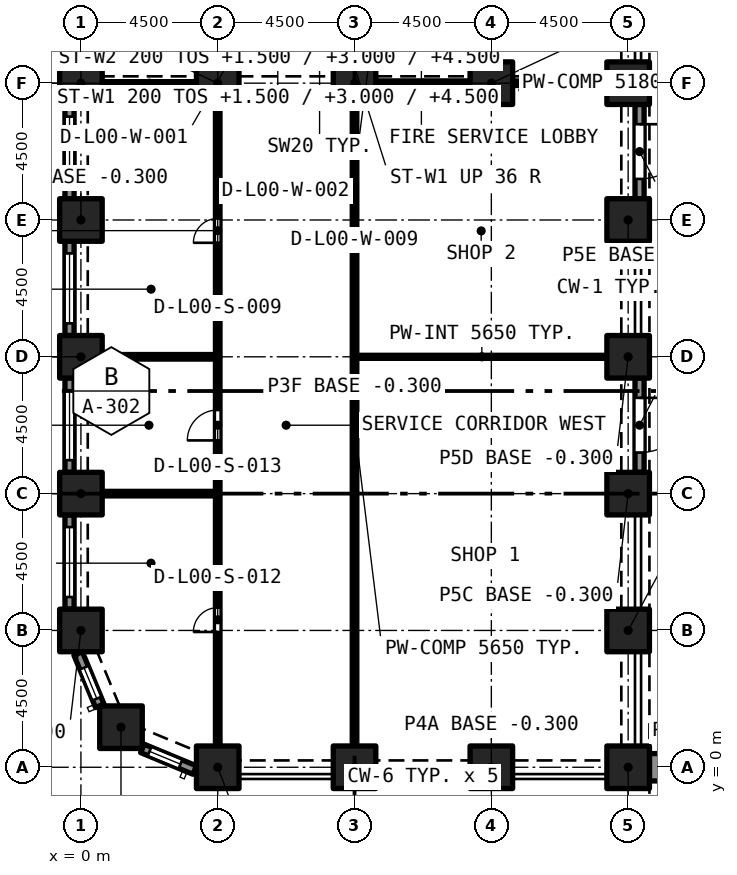
"""IFC4 building model, lengths in metres.
Left out: names, types, materials, properties, quantities, classifications, styles, units other than length and angle.
Written with IfcOpenShell. Run it as: python <this file> out.ifc"""

import sys

from ifc_helpers import new_model, si_unit, direction, frame, frame_2d, origin, origin_2d, place, context, subcontext, project, spatial, rectangle, extrude, element, fill, save


model = new_model("IFC4")
c1 = context("Model", 3, precision=1e-05, world=origin(), true_north=direction((0.0, 1.0)))
c2 = subcontext(c1, "Body", "Model", "MODEL_VIEW")
j1 = project(units=[si_unit("LENGTHUNIT", "METRE"), si_unit("PLANEANGLEUNIT", "RADIAN")], contexts=[c1])
p1 = place(None, origin())
s1 = spatial("IfcSite", under=j1, at=p1, CompositionType="ELEMENT")
p2 = place(p1, origin())
s2 = spatial("IfcBuilding", under=s1, at=p2, CompositionType="ELEMENT")
p3 = place(p2, origin())
s3 = spatial("IfcBuildingStorey", under=s2, at=p3, CompositionType="ELEMENT", Elevation=0.0)
for number, where, z_axis, x_axis in (
    (1, (4.5, 0.0, -0.3), (0.0, 0.0, 1.0), (1.0, 0.0, 0.0)),
    (2, (9.0, 0.0, -0.3), (0.0, 0.0, 1.0), (1.0, 0.0, 0.0)),
    (3, (13.5, 0.0, -0.3), (0.0, 0.0, 1.0), (1.0, 0.0, 0.0)),
    (4, (18.0, 0.0, -0.3), (0.0, 0.0, 1.0), (1.0, 0.0, 0.0)),
    (5, (1.318, 1.318, -0.3), (0.0, 0.0, 1.0), (1.0, 0.0, 0.0)),
    (6, (0.0, 4.5, -0.3), (0.0, 0.0, 1.0), (1.0, 0.0, 0.0)),
    (7, (18.0, 4.5, -0.3), (0.0, 0.0, 1.0), (1.0, 0.0, 0.0)),
    (8, (0.0, 9.0, -0.3), (0.0, 0.0, 1.0), (1.0, 0.0, 0.0)),
    (9, (18.0, 9.0, -0.3), (0.0, 0.0, 1.0), (1.0, 0.0, 0.0)),
    (10, (0.0, 13.5, -0.3), (0.0, 0.0, 1.0), (1.0, 0.0, 0.0)),
    (11, (18.0, 13.5, -0.3), (0.0, 0.0, 1.0), (1.0, 0.0, 0.0)),
    (12, (0.0, 18.0, -0.3), (0.0, 0.0, 1.0), (1.0, 0.0, 0.0)),
    (13, (18.0, 18.0, -0.3), (0.0, 0.0, 1.0), (1.0, 0.0, 0.0)),
    (14, (0.0, 22.5, -0.3), (0.0, 0.0, 1.0), (1.0, 0.0, 0.0)),
    (15, (4.5, 22.5, -0.3), (0.0, 0.0, 1.0), (1.0, 0.0, 0.0)),
    (16, (9.0, 22.5, -0.3), (0.0, 0.0, 1.0), (1.0, 0.0, 0.0)),
    (17, (13.5, 22.5, -0.3), (0.0, 0.0, 1.0), (1.0, 0.0, 0.0)),
    (18, (18.0, 22.5, -0.3), (0.0, 0.0, 1.0), (1.0, 0.0, 0.0)),
):
    element("IfcColumn", number, at=place(p3, frame(where, z_axis=z_axis, x_axis=x_axis)), inside=s3, PredefinedType="COLUMN", context=c2, shape_type="SweptSolid", body=[
        extrude(rectangle(XDim=1.4, YDim=1.4, at=origin_2d()), origin(), (0.0, 0.0, 1.0), 6.3),
    ])
p4 = place(p3, frame((-0.375, 23.2, 0.0), z_axis=(0.0, 0.0, 1.0), x_axis=(0.0, 1.0, 0.0)))
e19 = element("IfcWall", 19, at=p4, inside=s3, PredefinedType="SOLIDWALL", context=c2, shape_type="SweptSolid", body=[
    extrude(rectangle(XDim=3.1, YDim=0.3, at=frame_2d((1.55, 0.0))), origin(), (0.0, 0.0, 1.0), 6.0),
])
p5 = place(p4, frame((0.4, 0.0, 0.45)))
e20 = element("IfcOpeningElement", 20, at=p5, cuts=e19, PredefinedType="OPENING", context=c2, shape_type="SweptSolid", body=[
    extrude(rectangle(XDim=2.3, YDim=3.3, at=frame_2d((1.15, 1.65))), frame((0.0, 0.16, 0.0), z_axis=(0.0, -1.0, 0.0), x_axis=(1.0, 0.0, 0.0)), (0.0, 0.0, 1.0), 0.32),
])
p6 = place(p3, frame((-0.375, 18.7, 0.0), z_axis=(0.0, 0.0, 1.0), x_axis=(0.0, 1.0, 0.0)))
e21 = element("IfcWall", 21, at=p6, inside=s3, PredefinedType="SOLIDWALL", context=c2, shape_type="SweptSolid", body=[
    extrude(rectangle(XDim=3.1, YDim=0.3, at=frame_2d((1.55, 0.0))), origin(), (0.0, 0.0, 1.0), 6.0),
])
p7 = place(p6, frame((0.4, 0.0, 0.45)))
e22 = element("IfcOpeningElement", 22, at=p7, cuts=e21, PredefinedType="OPENING", context=c2, shape_type="SweptSolid", body=[
    extrude(rectangle(XDim=2.3, YDim=3.3, at=frame_2d((1.15, 1.65))), frame((0.0, 0.16, 0.0), z_axis=(0.0, -1.0, 0.0), x_axis=(1.0, 0.0, 0.0)), (0.0, 0.0, 1.0), 0.32),
])
p8 = place(p3, frame((-0.375, 14.2, 0.0), z_axis=(0.0, 0.0, 1.0), x_axis=(0.0, 1.0, 0.0)))
e23 = element("IfcWall", 23, at=p8, inside=s3, PredefinedType="SOLIDWALL", context=c2, shape_type="SweptSolid", body=[
    extrude(rectangle(XDim=3.1, YDim=0.3, at=frame_2d((1.55, 0.0))), origin(), (0.0, 0.0, 1.0), 6.0),
])
p9 = place(p8, frame((0.4, 0.0, 0.45)))
e24 = element("IfcOpeningElement", 24, at=p9, cuts=e23, PredefinedType="OPENING", context=c2, shape_type="SweptSolid", body=[
    extrude(rectangle(XDim=2.3, YDim=3.3, at=frame_2d((1.15, 1.65))), frame((0.0, 0.16, 0.0), z_axis=(0.0, -1.0, 0.0), x_axis=(1.0, 0.0, 0.0)), (0.0, 0.0, 1.0), 0.32),
])
p10 = place(p3, frame((-0.375, 9.7, 0.0), z_axis=(0.0, 0.0, 1.0), x_axis=(0.0, 1.0, 0.0)))
e25 = element("IfcWall", 25, at=p10, inside=s3, PredefinedType="SOLIDWALL", context=c2, shape_type="SweptSolid", body=[
    extrude(rectangle(XDim=3.1, YDim=0.3, at=frame_2d((1.55, 0.0))), origin(), (0.0, 0.0, 1.0), 6.0),
])
p11 = place(p10, frame((0.4, 0.0, 0.45)))
e26 = element("IfcOpeningElement", 26, at=p11, cuts=e25, PredefinedType="OPENING", context=c2, shape_type="SweptSolid", body=[
    extrude(rectangle(XDim=2.3, YDim=3.3, at=frame_2d((1.15, 1.65))), frame((0.0, 0.16, 0.0), z_axis=(0.0, -1.0, 0.0), x_axis=(1.0, 0.0, 0.0)), (0.0, 0.0, 1.0), 0.32),
])
p12 = place(p3, frame((-0.375, 5.2, 0.0), z_axis=(0.0, 0.0, 1.0), x_axis=(0.0, 1.0, 0.0)))
e27 = element("IfcWall", 27, at=p12, inside=s3, PredefinedType="SOLIDWALL", context=c2, shape_type="SweptSolid", body=[
    extrude(rectangle(XDim=3.1, YDim=0.3, at=frame_2d((1.55, 0.0))), origin(), (0.0, 0.0, 1.0), 6.0),
])
p13 = place(p12, frame((0.4, 0.0, 0.45)))
e28 = element("IfcOpeningElement", 28, at=p13, cuts=e27, PredefinedType="OPENING", context=c2, shape_type="SweptSolid", body=[
    extrude(rectangle(XDim=2.3, YDim=3.3, at=frame_2d((1.15, 1.65))), frame((0.0, 0.16, 0.0), z_axis=(0.0, -1.0, 0.0), x_axis=(1.0, 0.0, 0.0)), (0.0, 0.0, 1.0), 0.32),
])
p14 = place(p3, frame((0.622, 2.02, 0.0), z_axis=(0.0, 0.0, 1.0), x_axis=(-0.38262540684, 0.923903565336, 0.0)))
e29 = element("IfcWall", 29, at=p14, inside=s3, PredefinedType="SOLIDWALL", context=c2, shape_type="SweptSolid", body=[
    extrude(rectangle(XDim=1.865, YDim=0.3, at=frame_2d((0.933, 0.0))), origin(), (0.0, 0.0, 1.0), 6.0),
])
p15 = place(p14, frame((0.258, 0.0, 0.45)))
e30 = element("IfcOpeningElement", 30, at=p15, cuts=e29, PredefinedType="OPENING", context=c2, shape_type="SweptSolid", body=[
    extrude(rectangle(XDim=1.1, YDim=3.3, at=frame_2d((0.55, 1.65))), frame((0.0, 0.16, 0.0), z_axis=(0.0, -1.0, 0.0), x_axis=(1.0, 0.0, 0.0)), (0.0, 0.0, 1.0), 0.32),
])
p16 = place(p3, frame((3.743, -0.092, 0.0), z_axis=(0.0, 0.0, 1.0), x_axis=(-0.923857286003, 0.382737135771, 0.0)))
e31 = element("IfcWall", 31, at=p16, inside=s3, PredefinedType="SOLIDWALL", context=c2, shape_type="SweptSolid", body=[
    extrude(rectangle(XDim=1.865, YDim=0.3, at=frame_2d((0.933, 0.0))), origin(), (0.0, 0.0, 1.0), 6.0),
])
p17 = place(p16, frame((0.508, 0.0, 0.45)))
e32 = element("IfcOpeningElement", 32, at=p17, cuts=e31, PredefinedType="OPENING", context=c2, shape_type="SweptSolid", body=[
    extrude(rectangle(XDim=1.1, YDim=3.3, at=frame_2d((0.55, 1.65))), frame((0.0, 0.16, 0.0), z_axis=(0.0, -1.0, 0.0), x_axis=(1.0, 0.0, 0.0)), (0.0, 0.0, 1.0), 0.32),
])
p18 = place(p3, frame((18.375, 12.8, 0.0), z_axis=(0.0, 0.0, 1.0), x_axis=(0.0, -1.0, 0.0)))
e33 = element("IfcWall", 33, at=p18, inside=s3, PredefinedType="SOLIDWALL", context=c2, shape_type="SweptSolid", body=[
    extrude(rectangle(XDim=3.1, YDim=0.3, at=frame_2d((1.55, 0.0))), origin(), (0.0, 0.0, 1.0), 6.0),
])
p19 = place(p18, frame((0.65, 0.0, 0.0)))
e34 = element("IfcOpeningElement", 34, at=p19, cuts=e33, PredefinedType="OPENING", context=c2, shape_type="SweptSolid", body=[
    extrude(rectangle(XDim=1.8, YDim=2.4, at=frame_2d((0.9, 1.2))), frame((0.0, 0.16, 0.0), z_axis=(0.0, -1.0, 0.0), x_axis=(1.0, 0.0, 0.0)), (0.0, 0.0, 1.0), 0.32),
])
p20 = place(p3, frame((18.375, 21.8, 0.0), z_axis=(0.0, 0.0, 1.0), x_axis=(0.0, -1.0, 0.0)))
e35 = element("IfcWall", 35, at=p20, inside=s3, PredefinedType="SOLIDWALL", context=c2, shape_type="SweptSolid", body=[
    extrude(rectangle(XDim=3.1, YDim=0.3, at=frame_2d((1.55, 0.0))), origin(), (0.0, 0.0, 1.0), 6.0),
])
p21 = place(p20, frame((0.65, 0.0, 0.0)))
e36 = element("IfcOpeningElement", 36, at=p21, cuts=e35, PredefinedType="OPENING", context=c2, shape_type="SweptSolid", body=[
    extrude(rectangle(XDim=1.8, YDim=2.4, at=frame_2d((0.9, 1.2))), frame((0.0, 0.16, 0.0), z_axis=(0.0, -1.0, 0.0), x_axis=(1.0, 0.0, 0.0)), (0.0, 0.0, 1.0), 0.32),
])
p22 = place(p3, frame((18.7, 0.0, 0.0), z_axis=(0.0, 0.0, 1.0), x_axis=(1.0, 0.0, 0.0)))
e37 = element("IfcWall", 37, at=p22, inside=s3, PredefinedType="SOLIDWALL", context=c2, shape_type="SweptSolid", body=[
    extrude(rectangle(XDim=2.25, YDim=0.9, at=frame_2d((1.125, 0.0))), origin(), (0.0, 0.0, 1.0), 10.5),
])
p23 = place(p3, frame((4.5, 23.2, 0.0), z_axis=(0.0, 0.0, 1.0), x_axis=(0.0, 1.0, 0.0)))
e38 = element("IfcWall", 38, at=p23, inside=s3, PredefinedType="PARTITIONING", context=c2, shape_type="SweptSolid", body=[
    extrude(rectangle(XDim=3.875, YDim=0.15, at=frame_2d((1.938, 0.0))), origin(), (0.0, 0.0, 1.0), 5.65),
])
p24 = place(p23, frame((1.4, 0.0, 0.0)))
e39 = element("IfcOpeningElement", 39, at=p24, cuts=e38, PredefinedType="OPENING", context=c2, shape_type="SweptSolid", body=[
    extrude(rectangle(XDim=1.0, YDim=2.1, at=frame_2d((0.5, 1.05))), frame((0.0, 0.085, 0.0), z_axis=(0.0, -1.0, 0.0), x_axis=(1.0, 0.0, 0.0)), (0.0, 0.0, 1.0), 0.17),
])
p25 = place(p3, frame((0.7, 22.5, 0.0), z_axis=(0.0, 0.0, 1.0), x_axis=(1.0, 0.0, 0.0)))
e40 = element("IfcWall", 40, at=p25, inside=s3, PredefinedType="PARTITIONING", context=c2, shape_type="SweptSolid", body=[
    extrude(rectangle(XDim=3.1, YDim=0.1, at=frame_2d((1.55, 0.0))), origin(), (0.0, 0.0, 1.0), 5.18),
])
for number, where, z_axis, x_axis in (
    (41, (9.7, 22.5, 0.0), (0.0, 0.0, 1.0), (1.0, 0.0, 0.0)),
    (42, (14.2, 22.5, 0.0), (0.0, 0.0, 1.0), (1.0, 0.0, 0.0)),
):
    element("IfcWall", number, at=place(p3, frame(where, z_axis=z_axis, x_axis=x_axis)), inside=s3, PredefinedType="PARTITIONING", context=c2, shape_type="SweptSolid", body=[
        extrude(rectangle(XDim=3.1, YDim=0.15, at=frame_2d((1.55, 0.0))), origin(), (0.0, 0.0, 1.0), 5.18),
    ])
p26 = place(p3, frame((9.0, 0.7, 0.0), z_axis=(0.0, 0.0, 1.0), x_axis=(0.0, 1.0, 0.0)))
e43 = element("IfcWall", 43, at=p26, inside=s3, PredefinedType="PARTITIONING", context=c2, shape_type="SweptSolid", body=[
    extrude(rectangle(XDim=21.1, YDim=0.15, at=frame_2d((10.55, 0.0))), origin(), (0.0, 0.0, 1.0), 5.65),
])
p27 = place(p3, frame((4.5, 0.7, 0.0), z_axis=(0.0, 0.0, 1.0), x_axis=(0.0, 1.0, 0.0)))
e44 = element("IfcWall", 44, at=p27, inside=s3, PredefinedType="PARTITIONING", context=c2, shape_type="SweptSolid", body=[
    extrude(rectangle(XDim=8.3, YDim=0.15, at=frame_2d((4.15, 0.0))), origin(), (0.0, 0.0, 1.0), 5.65),
])
p28 = place(p27, frame((3.75, 0.0, 0.0)))
e45 = element("IfcOpeningElement", 45, at=p28, cuts=e44, PredefinedType="OPENING", context=c2, shape_type="SweptSolid", body=[
    extrude(rectangle(XDim=0.8, YDim=2.1, at=frame_2d((0.4, 1.05))), frame((0.0, 0.085, 0.0), z_axis=(0.0, -1.0, 0.0), x_axis=(1.0, 0.0, 0.0)), (0.0, 0.0, 1.0), 0.17),
])
p29 = place(p3, frame((4.5, 9.0, 0.0), z_axis=(0.0, 0.0, 1.0), x_axis=(0.0, 1.0, 0.0)))
e46 = element("IfcWall", 46, at=p29, inside=s3, PredefinedType="PARTITIONING", context=c2, shape_type="SweptSolid", body=[
    extrude(rectangle(XDim=4.5, YDim=0.15, at=frame_2d((2.25, 0.0))), origin(), (0.0, 0.0, 1.0), 5.65),
])
p30 = place(p29, frame((1.75, 0.0, 0.0)))
e47 = element("IfcOpeningElement", 47, at=p30, cuts=e46, PredefinedType="OPENING", context=c2, shape_type="SweptSolid", body=[
    extrude(rectangle(XDim=1.0, YDim=2.1, at=frame_2d((0.5, 1.05))), frame((0.0, 0.085, 0.0), z_axis=(0.0, -1.0, 0.0), x_axis=(1.0, 0.0, 0.0)), (0.0, 0.0, 1.0), 0.17),
])
p31 = place(p3, frame((4.5, 13.5, 0.0), z_axis=(0.0, 0.0, 1.0), x_axis=(0.0, 1.0, 0.0)))
e48 = element("IfcWall", 48, at=p31, inside=s3, PredefinedType="PARTITIONING", context=c2, shape_type="SweptSolid", body=[
    extrude(rectangle(XDim=8.3, YDim=0.15, at=frame_2d((4.15, 0.0))), origin(), (0.0, 0.0, 1.0), 5.65),
])
p32 = place(p31, frame((3.75, 0.0, 0.0)))
e49 = element("IfcOpeningElement", 49, at=p32, cuts=e48, PredefinedType="OPENING", context=c2, shape_type="SweptSolid", body=[
    extrude(rectangle(XDim=0.8, YDim=2.1, at=frame_2d((0.4, 1.05))), frame((0.0, 0.085, 0.0), z_axis=(0.0, -1.0, 0.0), x_axis=(1.0, 0.0, 0.0)), (0.0, 0.0, 1.0), 0.17),
])
p33 = place(p3, frame((9.075, 13.5, 0.0), z_axis=(0.0, 0.0, 1.0), x_axis=(1.0, 0.0, 0.0)))
e50 = element("IfcWall", 50, at=p33, inside=s3, PredefinedType="PARTITIONING", context=c2, shape_type="SweptSolid", body=[
    extrude(rectangle(XDim=8.225, YDim=0.1, at=frame_2d((4.113, 0.0))), origin(), (0.0, 0.0, 1.0), 5.65),
])
for number, where, z_axis, x_axis in (
    (51, (0.7, 9.0, 0.0), (0.0, 0.0, 1.0), (1.0, 0.0, 0.0)),
    (52, (0.7, 13.5, 0.0), (0.0, 0.0, 1.0), (1.0, 0.0, 0.0)),
):
    element("IfcWall", number, at=place(p3, frame(where, z_axis=z_axis, x_axis=x_axis)), inside=s3, PredefinedType="PARTITIONING", context=c2, shape_type="SweptSolid", body=[
        extrude(rectangle(XDim=3.725, YDim=0.15, at=frame_2d((1.863, 0.0))), origin(), (0.0, 0.0, 1.0), 5.65),
    ])
p34 = place(p7, origin())
e53 = element("IfcWindow", 53, at=p34, inside=s3, PartitioningType="SINGLE_PANEL", PredefinedType="WINDOW", context=c2, shape_type="SweptSolid", body=[
    extrude(rectangle(XDim=2.3, YDim=3.3, at=frame_2d((1.15, 1.65))), frame((0.0, 0.03, 0.0), z_axis=(0.0, -1.0, 0.0), x_axis=(1.0, 0.0, 0.0)), (0.0, 0.0, 1.0), 0.06),
])
fill(e22, e53)
p35 = place(p9, origin())
e54 = element("IfcWindow", 54, at=p35, inside=s3, PartitioningType="SINGLE_PANEL", PredefinedType="WINDOW", context=c2, shape_type="SweptSolid", body=[
    extrude(rectangle(XDim=2.3, YDim=3.3, at=frame_2d((1.15, 1.65))), frame((0.0, 0.03, 0.0), z_axis=(0.0, -1.0, 0.0), x_axis=(1.0, 0.0, 0.0)), (0.0, 0.0, 1.0), 0.06),
])
fill(e24, e54)
p36 = place(p11, origin())
e55 = element("IfcWindow", 55, at=p36, inside=s3, PartitioningType="SINGLE_PANEL", PredefinedType="WINDOW", context=c2, shape_type="SweptSolid", body=[
    extrude(rectangle(XDim=2.3, YDim=3.3, at=frame_2d((1.15, 1.65))), frame((0.0, 0.03, 0.0), z_axis=(0.0, -1.0, 0.0), x_axis=(1.0, 0.0, 0.0)), (0.0, 0.0, 1.0), 0.06),
])
fill(e26, e55)
p37 = place(p13, origin())
e56 = element("IfcWindow", 56, at=p37, inside=s3, PartitioningType="SINGLE_PANEL", PredefinedType="WINDOW", context=c2, shape_type="SweptSolid", body=[
    extrude(rectangle(XDim=2.3, YDim=3.3, at=frame_2d((1.15, 1.65))), frame((0.0, 0.03, 0.0), z_axis=(0.0, -1.0, 0.0), x_axis=(1.0, 0.0, 0.0)), (0.0, 0.0, 1.0), 0.06),
])
fill(e28, e56)
p38 = place(p15, origin())
e57 = element("IfcWindow", 57, at=p38, inside=s3, PartitioningType="SINGLE_PANEL", PredefinedType="WINDOW", context=c2, shape_type="SweptSolid", body=[
    extrude(rectangle(XDim=1.1, YDim=3.3, at=frame_2d((0.55, 1.65))), frame((0.0, 0.03, 0.0), z_axis=(0.0, -1.0, 0.0), x_axis=(1.0, 0.0, 0.0)), (0.0, 0.0, 1.0), 0.06),
])
fill(e30, e57)
p39 = place(p17, origin())
e58 = element("IfcWindow", 58, at=p39, inside=s3, PartitioningType="SINGLE_PANEL", PredefinedType="WINDOW", context=c2, shape_type="SweptSolid", body=[
    extrude(rectangle(XDim=1.1, YDim=3.3, at=frame_2d((0.55, 1.65))), frame((0.0, 0.03, 0.0), z_axis=(0.0, -1.0, 0.0), x_axis=(1.0, 0.0, 0.0)), (0.0, 0.0, 1.0), 0.06),
])
fill(e32, e58)
p40 = place(p19, origin())
e59 = element("IfcDoor", 59, at=p40, inside=s3, OperationType="SINGLE_SWING_LEFT", PredefinedType="DOOR", context=c2, shape_type="SweptSolid", body=[
    extrude(rectangle(XDim=1.8, YDim=2.4, at=frame_2d((0.9, 1.2))), frame((0.0, 0.025, 0.0), z_axis=(0.0, -1.0, 0.0), x_axis=(1.0, 0.0, 0.0)), (0.0, 0.0, 1.0), 0.05),
])
fill(e34, e59)
p41 = place(p21, origin())
e60 = element("IfcDoor", 60, at=p41, inside=s3, OperationType="SINGLE_SWING_LEFT", PredefinedType="DOOR", context=c2, shape_type="SweptSolid", body=[
    extrude(rectangle(XDim=1.8, YDim=2.4, at=frame_2d((0.9, 1.2))), frame((0.0, 0.025, 0.0), z_axis=(0.0, -1.0, 0.0), x_axis=(1.0, 0.0, 0.0)), (0.0, 0.0, 1.0), 0.05),
])
fill(e36, e60)
p42 = place(p28, origin())
e61 = element("IfcDoor", 61, at=p42, inside=s3, OperationType="SINGLE_SWING_LEFT", PredefinedType="DOOR", context=c2, shape_type="SweptSolid", body=[
    extrude(rectangle(XDim=0.8, YDim=2.1, at=frame_2d((0.4, 1.05))), frame((0.0, 0.025, 0.0), z_axis=(0.0, -1.0, 0.0), x_axis=(1.0, 0.0, 0.0)), (0.0, 0.0, 1.0), 0.05),
])
fill(e45, e61)
p43 = place(p30, origin())
e62 = element("IfcDoor", 62, at=p43, inside=s3, OperationType="SINGLE_SWING_RIGHT", PredefinedType="DOOR", context=c2, shape_type="SweptSolid", body=[
    extrude(rectangle(XDim=1.0, YDim=2.1, at=frame_2d((0.5, 1.05))), frame((0.0, 0.025, 0.0), z_axis=(0.0, -1.0, 0.0), x_axis=(1.0, 0.0, 0.0)), (0.0, 0.0, 1.0), 0.05),
])
fill(e47, e62)
p44 = place(p32, origin())
e63 = element("IfcDoor", 63, at=p44, inside=s3, OperationType="SINGLE_SWING_LEFT", PredefinedType="DOOR", context=c2, shape_type="SweptSolid", body=[
    extrude(rectangle(XDim=0.8, YDim=2.1, at=frame_2d((0.4, 1.05))), frame((0.0, 0.025, 0.0), z_axis=(0.0, -1.0, 0.0), x_axis=(1.0, 0.0, 0.0)), (0.0, 0.0, 1.0), 0.05),
])
fill(e49, e63)
save(model, sys.argv[1])
